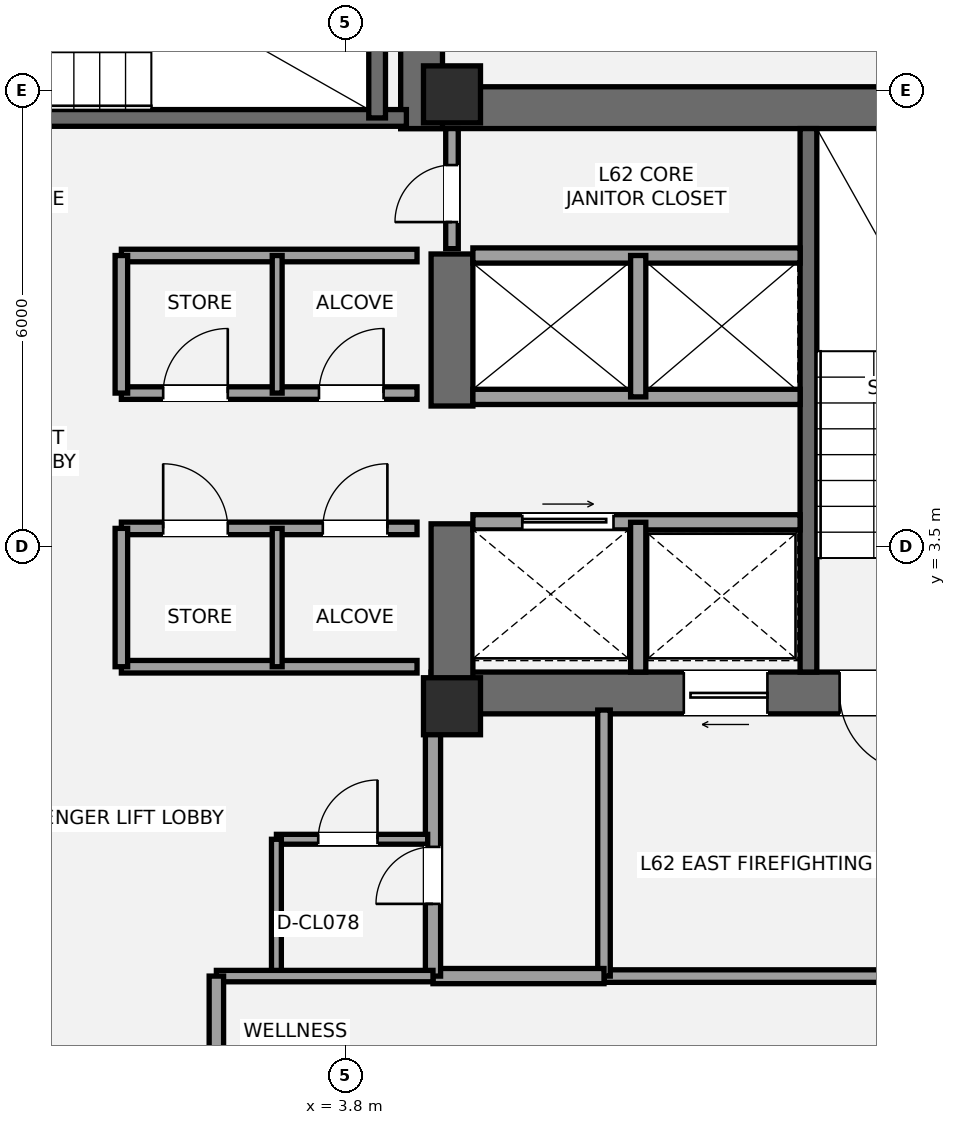
"""IFC4 building model, lengths in metres.
Left out: names, types, materials, properties, quantities, classifications, styles, units other than length and angle.
Written with IfcOpenShell. Run it as: python <this file> out.ifc"""

import sys

from ifc_helpers import new_model, si_unit, direction, frame, frame_2d, origin, origin_2d, place, context, subcontext, project, spatial, rectangle, extrude, element, fill, save


model = new_model("IFC4")
c1 = context("Model", 3, precision=1e-05, world=origin(), true_north=direction((0.0, 1.0)))
c2 = subcontext(c1, "Body", "Model", "MODEL_VIEW")
j1 = project(units=[si_unit("LENGTHUNIT", "METRE"), si_unit("PLANEANGLEUNIT", "RADIAN")], contexts=[c1])
p1 = place(None, origin())
s1 = spatial("IfcSite", under=j1, at=p1, CompositionType="ELEMENT")
p2 = place(p1, origin())
s2 = spatial("IfcBuilding", under=s1, at=p2, CompositionType="ELEMENT")
p3 = place(p2, frame((0.0, 0.0, 222.6)))
s3 = spatial("IfcBuildingStorey", under=s2, at=p3, CompositionType="ELEMENT", Elevation=222.6)
p4 = place(p3, frame((4.525, 9.275, 0.0), z_axis=(0.0, 0.0, 1.0), x_axis=(1.0, 0.0, 0.0)))
e1 = element("IfcWall", 1, at=p4, inside=s3, PredefinedType="SHEAR", context=c2, shape_type="SweptSolid", body=[
    extrude(rectangle(XDim=9.175, YDim=0.55, at=frame_2d((4.587, 0.0))), origin(), (0.0, 0.0, 1.0), 3.15),
])
p5 = place(p3, frame((13.7, 1.575, 0.0), z_axis=(0.0, 0.0, 1.0), x_axis=(-1.0, 0.0, 0.0)))
e2 = element("IfcWall", 2, at=p5, inside=s3, PredefinedType="SHEAR", context=c2, shape_type="SweptSolid", body=[
    extrude(rectangle(XDim=8.775, YDim=0.55, at=frame_2d((4.387, 0.0))), origin(), (0.0, 0.0, 1.0), 3.15),
])
p6 = place(p5, frame((2.35, 0.0, 0.0)))
e3 = element("IfcOpeningElement", 3, at=p6, cuts=e2, PredefinedType="OPENING", context=c2, shape_type="SweptSolid", body=[
    extrude(rectangle(XDim=1.05, YDim=2.15, at=frame_2d((0.525, 1.075))), frame((0.0, 0.285, 0.0), z_axis=(0.0, -1.0, 0.0), x_axis=(1.0, 0.0, 0.0)), (0.0, 0.0, 1.0), 0.57),
])
p7 = place(p5, frame((4.35, 0.0, 0.0)))
e4 = element("IfcOpeningElement", 4, at=p7, cuts=e2, PredefinedType="OPENING", context=c2, shape_type="SweptSolid", body=[
    extrude(rectangle(XDim=1.1, YDim=2.2, at=frame_2d((0.55, 1.1))), frame((0.0, 0.285, 0.0), z_axis=(0.0, -1.0, 0.0), x_axis=(1.0, 0.0, 0.0)), (0.0, 0.0, 1.0), 0.57),
])
p8 = place(p3, frame((5.2, 1.3, 0.0), z_axis=(0.0, 0.0, 1.0), x_axis=(0.0, 1.0, 0.0)))
e5 = element("IfcWall", 5, at=p8, inside=s3, PredefinedType="SHEAR", context=c2, shape_type="SweptSolid", body=[
    extrude(rectangle(XDim=2.5, YDim=0.55, at=frame_2d((1.25, 0.0))), origin(), (0.0, 0.0, 1.0), 3.15),
])
p9 = place(p3, frame((5.2, 5.35, 0.0), z_axis=(0.0, 0.0, 1.0), x_axis=(0.0, 1.0, 0.0)))
e6 = element("IfcWall", 6, at=p9, inside=s3, PredefinedType="SHEAR", context=c2, shape_type="SweptSolid", body=[
    extrude(rectangle(XDim=2.0, YDim=0.55, at=frame_2d((1.0, 0.0))), origin(), (0.0, 0.0, 1.0), 3.15),
])
p10 = place(p3, frame((9.89, 1.85, 0.0), z_axis=(0.0, 0.0, 1.0), x_axis=(0.0, 1.0, 0.0)))
e7 = element("IfcWall", 7, at=p10, inside=s3, PredefinedType="SHEAR", context=c2, shape_type="SweptSolid", body=[
    extrude(rectangle(XDim=7.15, YDim=0.22, at=frame_2d((3.575, 0.0))), origin(), (0.0, 0.0, 1.0), 3.15),
])
p11 = place(p3, frame((4.8, 9.0, 0.0), z_axis=(0.0, 0.0, 1.0), x_axis=(0.0, 1.0, 0.0)))
e8 = element("IfcWall", 8, at=p11, inside=s3, PredefinedType="SHEAR", context=c2, shape_type="SweptSolid", body=[
    extrude(rectangle(XDim=3.95, YDim=0.55, at=frame_2d((1.975, 0.0))), origin(), (0.0, 0.0, 1.0), 3.15),
])
p12 = place(p3, frame((-4.7, 9.14, 0.0), z_axis=(0.0, 0.0, 1.0), x_axis=(1.0, 0.0, 0.0)))
e9 = element("IfcWall", 9, at=p12, inside=s3, PredefinedType="SHEAR", context=c2, shape_type="SweptSolid", body=[
    extrude(rectangle(XDim=9.3, YDim=0.22, at=frame_2d((4.65, 0.0))), origin(), (0.0, 0.0, 1.0), 3.15),
])
p13 = place(p12, frame((1.15, 0.0, 0.0)))
e10 = element("IfcOpeningElement", 10, at=p13, cuts=e9, PredefinedType="OPENING", context=c2, shape_type="SweptSolid", body=[
    extrude(rectangle(XDim=1.05, YDim=2.15, at=frame_2d((0.525, 1.075))), frame((0.0, 0.12, 0.0), z_axis=(0.0, -1.0, 0.0), x_axis=(1.0, 0.0, 0.0)), (0.0, 0.0, 1.0), 0.24),
])
p14 = place(p3, frame((4.215, 9.14, 0.0), z_axis=(0.0, 0.0, 1.0), x_axis=(0.0, 1.0, 0.0)))
e11 = element("IfcWall", 11, at=p14, inside=s3, PredefinedType="SHEAR", context=c2, shape_type="SweptSolid", body=[
    extrude(rectangle(XDim=3.26, YDim=0.22, at=frame_2d((1.63, 0.0))), origin(), (0.0, 0.0, 1.0), 3.15),
])
for number, where, z_axis, x_axis in (
    (12, (5.2, 1.4, 0.0), (0.0, 0.0, 1.0), (1.0, 0.0, 0.0)),
    (13, (5.2, 9.45, 0.0), (0.0, 0.0, 1.0), (1.0, 0.0, 0.0)),
):
    element("IfcColumn", number, at=place(p3, frame(where, z_axis=z_axis, x_axis=x_axis)), inside=s3, PredefinedType="PILASTER", context=c2, shape_type="SweptSolid", body=[
        extrude(rectangle(XDim=0.75, YDim=0.75, at=origin_2d()), origin(), (0.0, 0.0, 1.0), 3.15),
    ])
p15 = place(p3, frame((7.2, -2.15, 0.0), z_axis=(0.0, 0.0, 1.0), x_axis=(1.0, 0.0, 0.0)))
e14 = element("IfcWall", 14, at=p15, inside=s3, PredefinedType="PARTITIONING", context=c2, shape_type="SweptSolid", body=[
    extrude(rectangle(XDim=6.25, YDim=0.165, at=frame_2d((3.125, 0.0))), origin(), (0.0, 0.0, 1.0), 2.97),
])
p16 = place(p3, frame((7.2, -2.15, 0.0), z_axis=(0.0, 0.0, 1.0), x_axis=(0.0, 1.0, 0.0)))
e15 = element("IfcWall", 15, at=p16, inside=s3, PredefinedType="PARTITIONING", context=c2, shape_type="SweptSolid", body=[
    extrude(rectangle(XDim=3.5, YDim=0.165, at=frame_2d((1.75, 0.0))), origin(), (0.0, 0.0, 1.0), 2.423),
])
p17 = place(p3, frame((4.95, -2.15, 0.0), z_axis=(0.0, 0.0, 1.0), x_axis=(1.0, 0.0, 0.0)))
e16 = element("IfcWall", 16, at=p17, inside=s3, PredefinedType="SOLIDWALL", context=c2, shape_type="SweptSolid", body=[
    extrude(rectangle(XDim=2.25, YDim=0.2, at=frame_2d((1.125, 0.0))), origin(), (0.0, 0.0, 1.0), 2.97),
])
p18 = place(p3, frame((4.95, -2.15, 0.0), z_axis=(0.0, 0.0, 1.0), x_axis=(0.0, 1.0, 0.0)))
e17 = element("IfcWall", 17, at=p18, inside=s3, PredefinedType="SOLIDWALL", context=c2, shape_type="SweptSolid", body=[
    extrude(rectangle(XDim=3.5, YDim=0.2, at=frame_2d((1.75, 0.0))), origin(), (0.0, 0.0, 1.0), 2.423),
])
p19 = place(p18, frame((0.95, 0.0, 0.0)))
e18 = element("IfcOpeningElement", 18, at=p19, cuts=e17, PredefinedType="OPENING", context=c2, shape_type="SweptSolid", body=[
    extrude(rectangle(XDim=0.75, YDim=2.1, at=frame_2d((0.375, 1.05))), frame((0.0, 0.11, 0.0), z_axis=(0.0, -1.0, 0.0), x_axis=(1.0, 0.0, 0.0)), (0.0, 0.0, 1.0), 0.22),
])
p20 = place(p3, frame((2.89, -0.35, 0.0), z_axis=(0.0, 0.0, 1.0), x_axis=(1.0, 0.0, 0.0)))
e19 = element("IfcWall", 19, at=p20, inside=s3, PredefinedType="PARTITIONING", context=c2, shape_type="SweptSolid", body=[
    extrude(rectangle(XDim=1.99, YDim=0.13, at=frame_2d((0.995, 0.0))), origin(), (0.0, 0.0, 1.0), 2.423),
])
p21 = place(p20, frame((0.55, 0.0, 0.0)))
e20 = element("IfcOpeningElement", 20, at=p21, cuts=e19, PredefinedType="OPENING", context=c2, shape_type="SweptSolid", body=[
    extrude(rectangle(XDim=0.78, YDim=2.1, at=frame_2d((0.39, 1.05))), frame((0.0, 0.075, 0.0), z_axis=(0.0, -1.0, 0.0), x_axis=(1.0, 0.0, 0.0)), (0.0, 0.0, 1.0), 0.15),
])
p22 = place(p3, frame((2.89, -2.15, 0.0), z_axis=(0.0, 0.0, 1.0), x_axis=(0.0, 1.0, 0.0)))
e21 = element("IfcWall", 21, at=p22, inside=s3, PredefinedType="PARTITIONING", context=c2, shape_type="SweptSolid", body=[
    extrude(rectangle(XDim=1.8, YDim=0.13, at=frame_2d((0.9, 0.0))), origin(), (0.0, 0.0, 1.0), 2.97),
])
p23 = place(p3, frame((5.475, 3.82, 0.0), z_axis=(0.0, 0.0, 1.0), x_axis=(1.0, 0.0, 0.0)))
e22 = element("IfcWall", 22, at=p23, inside=s3, PredefinedType="SOLIDWALL", context=c2, shape_type="SweptSolid", body=[
    extrude(rectangle(XDim=4.305, YDim=0.2, at=frame_2d((2.152, 0.0))), origin(), (0.0, 0.0, 1.0), 2.97),
])
p24 = place(p23, frame((0.65, 0.0, 0.0)))
e23 = element("IfcOpeningElement", 23, at=p24, cuts=e22, PredefinedType="OPENING", context=c2, shape_type="SweptSolid", body=[
    extrude(rectangle(XDim=1.2, YDim=2.2, at=frame_2d((0.6, 1.1))), frame((0.0, 0.11, 0.0), z_axis=(0.0, -1.0, 0.0), x_axis=(1.0, 0.0, 0.0)), (0.0, 0.0, 1.0), 0.22),
])
p25 = place(p3, frame((7.65, 1.85, 0.0), z_axis=(0.0, 0.0, 1.0), x_axis=(0.0, 1.0, 0.0)))
e24 = element("IfcWall", 24, at=p25, inside=s3, PredefinedType="SOLIDWALL", context=c2, shape_type="SweptSolid", body=[
    extrude(rectangle(XDim=1.97, YDim=0.2, at=frame_2d((0.985, 0.0))), origin(), (0.0, 0.0, 1.0), 2.97),
])
for number, where, z_axis, x_axis in (
    (25, (5.475, 5.47, 0.0), (0.0, 0.0, 1.0), (1.0, 0.0, 0.0)),
    (26, (5.475, 7.33, 0.0), (0.0, 0.0, 1.0), (1.0, 0.0, 0.0)),
):
    element("IfcWall", number, at=place(p3, frame(where, z_axis=z_axis, x_axis=x_axis)), inside=s3, PredefinedType="SOLIDWALL", context=c2, shape_type="SweptSolid", body=[
        extrude(rectangle(XDim=4.305, YDim=0.2, at=frame_2d((2.152, 0.0))), origin(), (0.0, 0.0, 1.0), 2.97),
    ])
p26 = place(p3, frame((7.65, 5.47, 0.0), z_axis=(0.0, 0.0, 1.0), x_axis=(0.0, 1.0, 0.0)))
e27 = element("IfcWall", 27, at=p26, inside=s3, PredefinedType="SOLIDWALL", context=c2, shape_type="SweptSolid", body=[
    extrude(rectangle(XDim=1.86, YDim=0.2, at=frame_2d((0.93, 0.0))), origin(), (0.0, 0.0, 1.0), 2.97),
])
p27 = place(p3, frame((0.85, 1.92, 0.0), z_axis=(0.0, 0.0, 1.0), x_axis=(1.0, 0.0, 0.0)))
e28 = element("IfcWall", 28, at=p27, inside=s3, PredefinedType="PARTITIONING", context=c2, shape_type="SweptSolid", body=[
    extrude(rectangle(XDim=3.89, YDim=0.165, at=frame_2d((1.945, 0.0))), origin(), (0.0, 0.0, 1.0), 2.11),
])
p28 = place(p3, frame((0.85, 3.74, 0.0), z_axis=(0.0, 0.0, 1.0), x_axis=(1.0, 0.0, 0.0)))
e29 = element("IfcWall", 29, at=p28, inside=s3, PredefinedType="PARTITIONING", context=c2, shape_type="SweptSolid", body=[
    extrude(rectangle(XDim=3.89, YDim=0.165, at=frame_2d((1.945, 0.0))), origin(), (0.0, 0.0, 1.0), 2.97),
])
p29 = place(p28, frame((0.55, 0.0, 0.0)))
e30 = element("IfcOpeningElement", 30, at=p29, cuts=e29, PredefinedType="OPENING", context=c2, shape_type="SweptSolid", body=[
    extrude(rectangle(XDim=0.85, YDim=2.1, at=frame_2d((0.425, 1.05))), frame((0.0, 0.093, 0.0), z_axis=(0.0, -1.0, 0.0), x_axis=(1.0, 0.0, 0.0)), (0.0, 0.0, 1.0), 0.185),
])
p30 = place(p28, frame((2.65, 0.0, 0.0)))
e31 = element("IfcOpeningElement", 31, at=p30, cuts=e29, PredefinedType="OPENING", context=c2, shape_type="SweptSolid", body=[
    extrude(rectangle(XDim=0.85, YDim=2.1, at=frame_2d((0.425, 1.05))), frame((0.0, 0.093, 0.0), z_axis=(0.0, -1.0, 0.0), x_axis=(1.0, 0.0, 0.0)), (0.0, 0.0, 1.0), 0.185),
])
p31 = place(p3, frame((0.85, 1.92, 0.0), z_axis=(0.0, 0.0, 1.0), x_axis=(0.0, 1.0, 0.0)))
e32 = element("IfcWall", 32, at=p31, inside=s3, PredefinedType="PARTITIONING", context=c2, shape_type="SweptSolid", body=[
    extrude(rectangle(XDim=1.82, YDim=0.165, at=frame_2d((0.91, 0.0))), origin(), (0.0, 0.0, 1.0), 2.97),
])
p32 = place(p3, frame((2.9, 1.92, 0.0), z_axis=(0.0, 0.0, 1.0), x_axis=(0.0, 1.0, 0.0)))
e33 = element("IfcWall", 33, at=p32, inside=s3, PredefinedType="PARTITIONING", context=c2, shape_type="SweptSolid", body=[
    extrude(rectangle(XDim=1.82, YDim=0.13, at=frame_2d((0.91, 0.0))), origin(), (0.0, 0.0, 1.0), 2.97),
])
p33 = place(p3, frame((0.85, 5.52, 0.0), z_axis=(0.0, 0.0, 1.0), x_axis=(1.0, 0.0, 0.0)))
e34 = element("IfcWall", 34, at=p33, inside=s3, PredefinedType="PARTITIONING", context=c2, shape_type="SweptSolid", body=[
    extrude(rectangle(XDim=3.89, YDim=0.165, at=frame_2d((1.945, 0.0))), origin(), (0.0, 0.0, 1.0), 2.97),
])
p34 = place(p33, frame((0.55, 0.0, 0.0)))
e35 = element("IfcOpeningElement", 35, at=p34, cuts=e34, PredefinedType="OPENING", context=c2, shape_type="SweptSolid", body=[
    extrude(rectangle(XDim=0.85, YDim=2.1, at=frame_2d((0.425, 1.05))), frame((0.0, 0.093, 0.0), z_axis=(0.0, -1.0, 0.0), x_axis=(1.0, 0.0, 0.0)), (0.0, 0.0, 1.0), 0.185),
])
p35 = place(p33, frame((2.6, 0.0, 0.0)))
e36 = element("IfcOpeningElement", 36, at=p35, cuts=e34, PredefinedType="OPENING", context=c2, shape_type="SweptSolid", body=[
    extrude(rectangle(XDim=0.85, YDim=2.1, at=frame_2d((0.425, 1.05))), frame((0.0, 0.093, 0.0), z_axis=(0.0, -1.0, 0.0), x_axis=(1.0, 0.0, 0.0)), (0.0, 0.0, 1.0), 0.185),
])
p36 = place(p3, frame((0.85, 7.33, 0.0), z_axis=(0.0, 0.0, 1.0), x_axis=(1.0, 0.0, 0.0)))
e37 = element("IfcWall", 37, at=p36, inside=s3, PredefinedType="PARTITIONING", context=c2, shape_type="SweptSolid", body=[
    extrude(rectangle(XDim=3.89, YDim=0.165, at=frame_2d((1.945, 0.0))), origin(), (0.0, 0.0, 1.0), 2.97),
])
p37 = place(p3, frame((0.85, 5.52, 0.0), z_axis=(0.0, 0.0, 1.0), x_axis=(0.0, 1.0, 0.0)))
e38 = element("IfcWall", 38, at=p37, inside=s3, PredefinedType="PARTITIONING", context=c2, shape_type="SweptSolid", body=[
    extrude(rectangle(XDim=1.81, YDim=0.165, at=frame_2d((0.905, 0.0))), origin(), (0.0, 0.0, 1.0), 2.97),
])
p38 = place(p3, frame((2.9, 5.52, 0.0), z_axis=(0.0, 0.0, 1.0), x_axis=(0.0, 1.0, 0.0)))
e39 = element("IfcWall", 39, at=p38, inside=s3, PredefinedType="PARTITIONING", context=c2, shape_type="SweptSolid", body=[
    extrude(rectangle(XDim=1.81, YDim=0.13, at=frame_2d((0.905, 0.0))), origin(), (0.0, 0.0, 1.0), 2.97),
])
p39 = place(p3, frame((5.2, 7.42, 0.0), z_axis=(0.0, 0.0, 1.0), x_axis=(0.0, 1.0, 0.0)))
e40 = element("IfcWall", 40, at=p39, inside=s3, PredefinedType="PARTITIONING", context=c2, shape_type="SweptSolid", body=[
    extrude(rectangle(XDim=1.58, YDim=0.165, at=frame_2d((0.79, 0.0))), origin(), (0.0, 0.0, 1.0), 2.97),
])
p40 = place(p39, frame((0.35, 0.0, 0.0)))
e41 = element("IfcOpeningElement", 41, at=p40, cuts=e40, PredefinedType="OPENING", context=c2, shape_type="SweptSolid", body=[
    extrude(rectangle(XDim=0.75, YDim=2.1, at=frame_2d((0.375, 1.05))), frame((0.0, 0.093, 0.0), z_axis=(0.0, -1.0, 0.0), x_axis=(1.0, 0.0, 0.0)), (0.0, 0.0, 1.0), 0.185),
])
p41 = place(p3, frame((2.1, -2.15, 0.0), z_axis=(0.0, 0.0, 1.0), x_axis=(1.0, 0.0, 0.0)))
e42 = element("IfcWall", 42, at=p41, inside=s3, PredefinedType="PLUMBINGWALL", context=c2, shape_type="SweptSolid", body=[
    extrude(rectangle(XDim=2.85, YDim=0.15, at=frame_2d((1.425, 0.0))), origin(), (0.0, 0.0, 1.0), 2.97),
])
p42 = place(p3, frame((2.1, -4.05, 0.0), z_axis=(0.0, 0.0, 1.0), x_axis=(0.0, 1.0, 0.0)))
e43 = element("IfcWall", 43, at=p42, inside=s3, PredefinedType="PLUMBINGWALL", context=c2, shape_type="SweptSolid", body=[
    extrude(rectangle(XDim=1.9, YDim=0.19, at=frame_2d((0.95, 0.0))), origin(), (0.0, 0.0, 1.0), 2.97),
])
p43 = place(p6, origin())
e44 = element("IfcDoor", 44, at=p43, inside=s3, OperationType="SINGLE_SWING_LEFT", PredefinedType="DOOR", context=c2, shape_type="SweptSolid", body=[
    extrude(rectangle(XDim=1.05, YDim=2.15, at=frame_2d((0.525, 1.075))), frame((0.0, 0.025, 0.0), z_axis=(0.0, -1.0, 0.0), x_axis=(1.0, 0.0, 0.0)), (0.0, 0.0, 1.0), 0.05),
])
fill(e3, e44)
p44 = place(p19, origin())
e45 = element("IfcDoor", 45, at=p44, inside=s3, OperationType="SINGLE_SWING_LEFT", PredefinedType="DOOR", context=c2, shape_type="SweptSolid", body=[
    extrude(rectangle(XDim=0.75, YDim=2.1, at=frame_2d((0.375, 1.05))), frame((0.0, 0.025, 0.0), z_axis=(0.0, -1.0, 0.0), x_axis=(1.0, 0.0, 0.0)), (0.0, 0.0, 1.0), 0.05),
])
fill(e18, e45)
p45 = place(p21, origin())
e46 = element("IfcDoor", 46, at=p45, inside=s3, OperationType="SINGLE_SWING_RIGHT", PredefinedType="DOOR", context=c2, shape_type="SweptSolid", body=[
    extrude(rectangle(XDim=0.78, YDim=2.1, at=frame_2d((0.39, 1.05))), frame((0.0, 0.025, 0.0), z_axis=(0.0, -1.0, 0.0), x_axis=(1.0, 0.0, 0.0)), (0.0, 0.0, 1.0), 0.05),
])
fill(e20, e46)
p46 = place(p7, origin())
e47 = element("IfcDoor", 47, at=p46, inside=s3, OperationType="SLIDING_TO_LEFT", PredefinedType="DOOR", context=c2, shape_type="SweptSolid", body=[
    extrude(rectangle(XDim=1.1, YDim=2.2, at=frame_2d((0.55, 1.1))), frame((0.0, 0.025, 0.0), z_axis=(0.0, -1.0, 0.0), x_axis=(1.0, 0.0, 0.0)), (0.0, 0.0, 1.0), 0.05),
])
fill(e4, e47)
p47 = place(p24, origin())
e48 = element("IfcDoor", 48, at=p47, inside=s3, OperationType="SLIDING_TO_RIGHT", PredefinedType="DOOR", context=c2, shape_type="SweptSolid", body=[
    extrude(rectangle(XDim=1.2, YDim=2.2, at=frame_2d((0.6, 1.1))), frame((0.0, 0.025, 0.0), z_axis=(0.0, -1.0, 0.0), x_axis=(1.0, 0.0, 0.0)), (0.0, 0.0, 1.0), 0.05),
])
fill(e23, e48)
p48 = place(p29, origin())
e49 = element("IfcDoor", 49, at=p48, inside=s3, OperationType="SINGLE_SWING_LEFT", PredefinedType="DOOR", context=c2, shape_type="SweptSolid", body=[
    extrude(rectangle(XDim=0.85, YDim=2.1, at=frame_2d((0.425, 1.05))), frame((0.0, 0.025, 0.0), z_axis=(0.0, -1.0, 0.0), x_axis=(1.0, 0.0, 0.0)), (0.0, 0.0, 1.0), 0.05),
])
fill(e30, e49)
p49 = place(p30, origin())
e50 = element("IfcDoor", 50, at=p49, inside=s3, OperationType="SINGLE_SWING_RIGHT", PredefinedType="DOOR", context=c2, shape_type="SweptSolid", body=[
    extrude(rectangle(XDim=0.85, YDim=2.1, at=frame_2d((0.425, 1.05))), frame((0.0, 0.025, 0.0), z_axis=(0.0, -1.0, 0.0), x_axis=(1.0, 0.0, 0.0)), (0.0, 0.0, 1.0), 0.05),
])
fill(e31, e50)
p50 = place(p34, origin())
e51 = element("IfcDoor", 51, at=p50, inside=s3, OperationType="SINGLE_SWING_RIGHT", PredefinedType="DOOR", context=c2, shape_type="SweptSolid", body=[
    extrude(rectangle(XDim=0.85, YDim=2.1, at=frame_2d((0.425, 1.05))), frame((0.0, 0.025, 0.0), z_axis=(0.0, -1.0, 0.0), x_axis=(1.0, 0.0, 0.0)), (0.0, 0.0, 1.0), 0.05),
])
fill(e35, e51)
p51 = place(p35, origin())
e52 = element("IfcDoor", 52, at=p51, inside=s3, OperationType="SINGLE_SWING_RIGHT", PredefinedType="DOOR", context=c2, shape_type="SweptSolid", body=[
    extrude(rectangle(XDim=0.85, YDim=2.1, at=frame_2d((0.425, 1.05))), frame((0.0, 0.025, 0.0), z_axis=(0.0, -1.0, 0.0), x_axis=(1.0, 0.0, 0.0)), (0.0, 0.0, 1.0), 0.05),
])
fill(e36, e52)
p52 = place(p40, origin())
e53 = element("IfcDoor", 53, at=p52, inside=s3, OperationType="SINGLE_SWING_LEFT", PredefinedType="DOOR", context=c2, shape_type="SweptSolid", body=[
    extrude(rectangle(XDim=0.75, YDim=2.1, at=frame_2d((0.375, 1.05))), frame((0.0, 0.025, 0.0), z_axis=(0.0, -1.0, 0.0), x_axis=(1.0, 0.0, 0.0)), (0.0, 0.0, 1.0), 0.05),
])
fill(e41, e53)
save(model, sys.argv[1])
